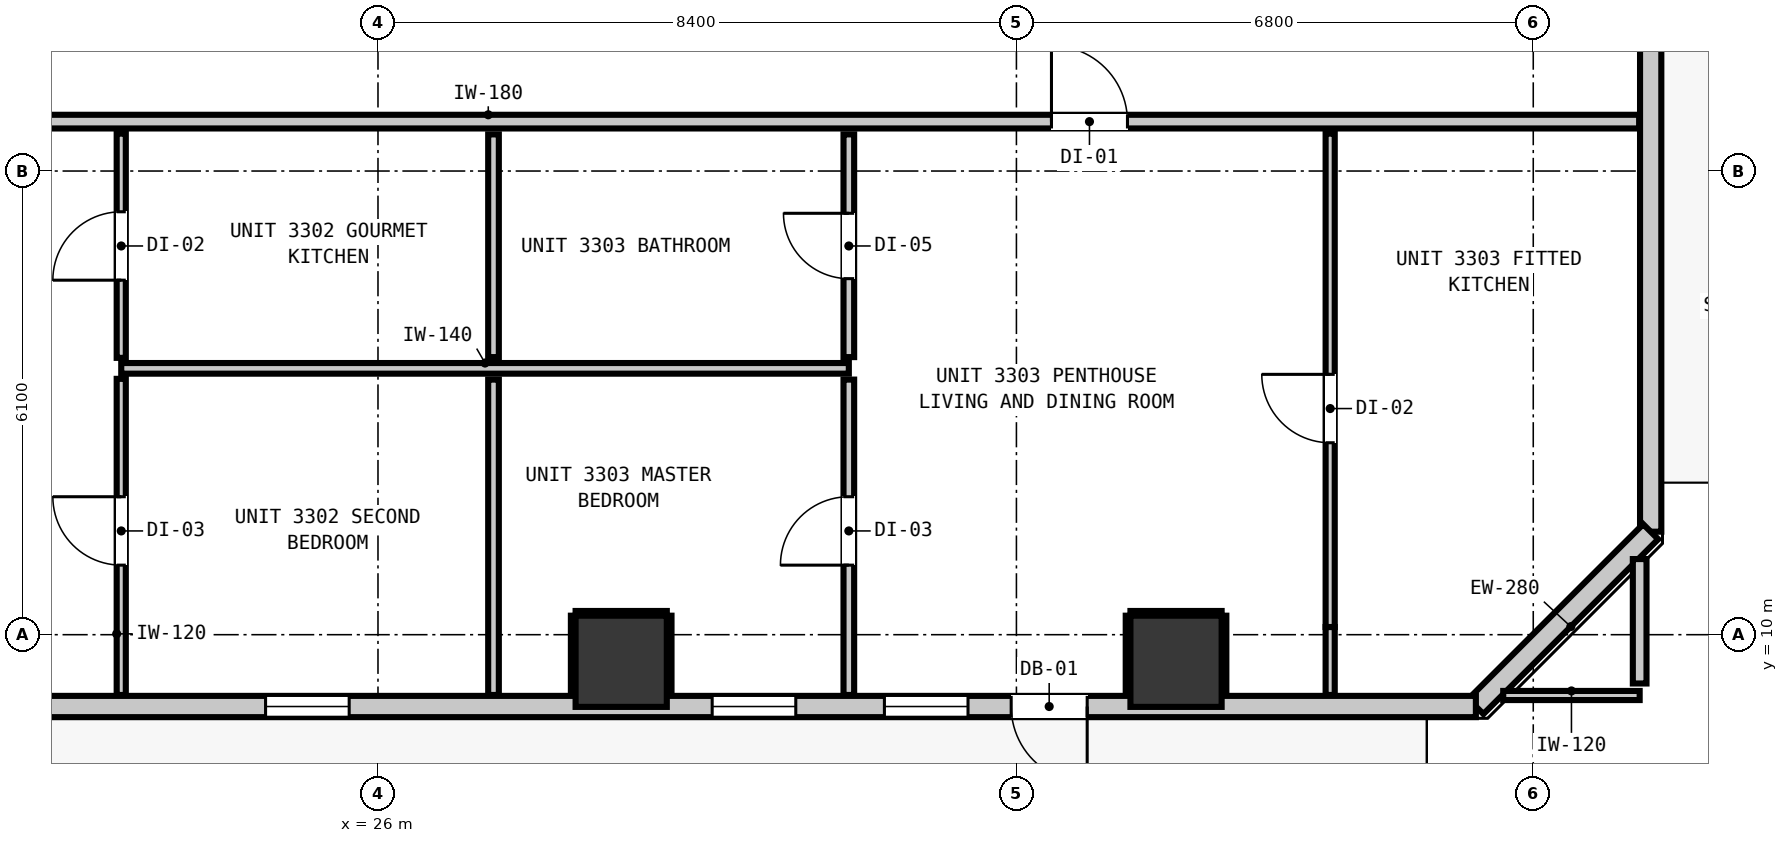
"""IFC4 building model, lengths in metres.
Left out: names, types, materials, properties, quantities, classifications, styles, units other than length and angle.
Written with IfcOpenShell. Run it as: python <this file> out.ifc"""

import sys

from ifc_helpers import new_model, si_unit, direction, frame, frame_2d, origin, origin_2d, place, context, subcontext, project, spatial, rectangle, extrude, element, fill, save


model = new_model("IFC4")
c1 = context("Model", 3, precision=1e-05, world=origin(), true_north=direction((0.0, 1.0)))
c2 = subcontext(c1, "Body", "Model", "MODEL_VIEW")
j1 = project(units=[si_unit("LENGTHUNIT", "METRE"), si_unit("PLANEANGLEUNIT", "RADIAN")], contexts=[c1])
p1 = place(None, origin())
s1 = spatial("IfcSite", under=j1, at=p1, CompositionType="ELEMENT")
p2 = place(p1, origin())
s2 = spatial("IfcBuilding", under=s1, at=p2, CompositionType="ELEMENT")
p3 = place(p2, frame((0.0, 0.0, 116.04)))
s3 = spatial("IfcBuildingStorey", under=s2, at=p3, CompositionType="ELEMENT", Elevation=116.04)
for number, where, z_axis, x_axis in (
    (1, (29.2, 9.65, 0.0), (0.0, 0.0, 1.0), (1.0, 0.0, 0.0)),
    (2, (36.5, 9.65, 0.0), (0.0, 0.0, 1.0), (1.0, 0.0, 0.0)),
):
    element("IfcColumn", number, at=place(p3, frame(where, z_axis=z_axis, x_axis=x_axis)), inside=s3, PredefinedType="COLUMN", context=c2, shape_type="SweptSolid", body=[
        extrude(rectangle(XDim=1.2, YDim=1.2, at=origin_2d()), origin(), (0.0, 0.0, 1.0), 3.32),
    ])
p4 = place(p3, frame((42.745, 43.645, 0.0), z_axis=(0.0, 0.0, 1.0), x_axis=(0.0, -1.0, 0.0)))
e3 = element("IfcWall", 3, at=p4, inside=s3, PredefinedType="STANDARD", context=c2, shape_type="SweptSolid", body=[
    extrude(rectangle(XDim=32.29, YDim=0.28, at=frame_2d((16.145, 0.0))), origin(), (0.0, 0.0, 1.0), 3.08),
])
p5 = place(p4, frame((5.467, 0.0, 0.0)))
e4 = element("IfcOpeningElement", 4, at=p5, cuts=e3, PredefinedType="OPENING", context=c2, shape_type="SweptSolid", body=[
    extrude(rectangle(XDim=1.0, YDim=2.15, at=frame_2d((0.5, 1.075))), frame((0.0, 0.15, 0.0), z_axis=(0.0, -1.0, 0.0), x_axis=(1.0, 0.0, 0.0)), (0.0, 0.0, 1.0), 0.3),
])
p6 = place(p4, frame((0.293, 0.0, 0.85)))
e5 = element("IfcOpeningElement", 5, at=p6, cuts=e3, PredefinedType="OPENING", context=c2, shape_type="SweptSolid", body=[
    extrude(rectangle(XDim=1.1, YDim=2.05, at=frame_2d((0.55, 1.025))), frame((0.0, 0.15, 0.0), z_axis=(0.0, -1.0, 0.0), x_axis=(1.0, 0.0, 0.0)), (0.0, 0.0, 1.0), 0.3),
])
p7 = place(p4, frame((14.773, 0.0, 0.85)))
e6 = element("IfcOpeningElement", 6, at=p7, cuts=e3, PredefinedType="OPENING", context=c2, shape_type="SweptSolid", body=[
    extrude(rectangle(XDim=1.1, YDim=2.05, at=frame_2d((0.55, 1.025))), frame((0.0, 0.15, 0.0), z_axis=(0.0, -1.0, 0.0), x_axis=(1.0, 0.0, 0.0)), (0.0, 0.0, 1.0), 0.3),
])
p8 = place(p3, frame((42.745, 11.355, 0.0), z_axis=(0.0, 0.0, 1.0), x_axis=(-0.707106781187, -0.707106781187, 0.0)))
e7 = element("IfcWall", 7, at=p8, inside=s3, PredefinedType="STANDARD", context=c2, shape_type="SweptSolid", body=[
    extrude(rectangle(XDim=3.253, YDim=0.28, at=frame_2d((1.626, 0.0))), origin(), (0.0, 0.0, 1.0), 3.08),
])
p9 = place(p3, frame((40.445, 9.055, 0.0), z_axis=(0.0, 0.0, 1.0), x_axis=(-1.0, 0.0, 0.0)))
e8 = element("IfcWall", 8, at=p9, inside=s3, PredefinedType="STANDARD", context=c2, shape_type="SweptSolid", body=[
    extrude(rectangle(XDim=35.09, YDim=0.28, at=frame_2d((17.545, 0.0))), origin(), (0.0, 0.0, 1.0), 3.08),
])
p10 = place(p9, frame((5.114, 0.0, 0.0)))
e9 = element("IfcOpeningElement", 9, at=p10, cuts=e8, PredefinedType="OPENING", context=c2, shape_type="SweptSolid", body=[
    extrude(rectangle(XDim=1.0, YDim=2.15, at=frame_2d((0.5, 1.075))), frame((0.0, 0.15, 0.0), z_axis=(0.0, -1.0, 0.0), x_axis=(1.0, 0.0, 0.0)), (0.0, 0.0, 1.0), 0.3),
])
p11 = place(p9, frame((31.877, 0.0, 0.85)))
e10 = element("IfcOpeningElement", 10, at=p11, cuts=e8, PredefinedType="OPENING", context=c2, shape_type="SweptSolid", body=[
    extrude(rectangle(XDim=1.1, YDim=2.05, at=frame_2d((0.55, 1.025))), frame((0.0, 0.15, 0.0), z_axis=(0.0, -1.0, 0.0), x_axis=(1.0, 0.0, 0.0)), (0.0, 0.0, 1.0), 0.3),
])
p12 = place(p9, frame((34.198, 0.0, 0.85)))
e11 = element("IfcOpeningElement", 11, at=p12, cuts=e8, PredefinedType="OPENING", context=c2, shape_type="SweptSolid", body=[
    extrude(rectangle(XDim=0.58, YDim=1.5, at=frame_2d((0.29, 0.75))), frame((0.0, 0.15, 0.0), z_axis=(0.0, -1.0, 0.0), x_axis=(1.0, 0.0, 0.0)), (0.0, 0.0, 1.0), 0.3),
])
p13 = place(p9, frame((21.515, 0.0, 0.85)))
e12 = element("IfcOpeningElement", 12, at=p13, cuts=e8, PredefinedType="OPENING", context=c2, shape_type="SweptSolid", body=[
    extrude(rectangle(XDim=1.1, YDim=2.05, at=frame_2d((0.55, 1.025))), frame((0.0, 0.15, 0.0), z_axis=(0.0, -1.0, 0.0), x_axis=(1.0, 0.0, 0.0)), (0.0, 0.0, 1.0), 0.3),
])
p14 = place(p9, frame((24.715, 0.0, 0.85)))
e13 = element("IfcOpeningElement", 13, at=p14, cuts=e8, PredefinedType="OPENING", context=c2, shape_type="SweptSolid", body=[
    extrude(rectangle(XDim=1.1, YDim=2.05, at=frame_2d((0.55, 1.025))), frame((0.0, 0.15, 0.0), z_axis=(0.0, -1.0, 0.0), x_axis=(1.0, 0.0, 0.0)), (0.0, 0.0, 1.0), 0.3),
])
p15 = place(p9, frame((14.824, 0.0, 0.85)))
e14 = element("IfcOpeningElement", 14, at=p15, cuts=e8, PredefinedType="OPENING", context=c2, shape_type="SweptSolid", body=[
    extrude(rectangle(XDim=1.1, YDim=2.05, at=frame_2d((0.55, 1.025))), frame((0.0, 0.15, 0.0), z_axis=(0.0, -1.0, 0.0), x_axis=(1.0, 0.0, 0.0)), (0.0, 0.0, 1.0), 0.3),
])
p16 = place(p9, frame((6.682, 0.0, 0.85)))
e15 = element("IfcOpeningElement", 15, at=p16, cuts=e8, PredefinedType="OPENING", context=c2, shape_type="SweptSolid", body=[
    extrude(rectangle(XDim=1.1, YDim=2.05, at=frame_2d((0.55, 1.025))), frame((0.0, 0.15, 0.0), z_axis=(0.0, -1.0, 0.0), x_axis=(1.0, 0.0, 0.0)), (0.0, 0.0, 1.0), 0.3),
])
p17 = place(p9, frame((8.948, 0.0, 0.85)))
e16 = element("IfcOpeningElement", 16, at=p17, cuts=e8, PredefinedType="OPENING", context=c2, shape_type="SweptSolid", body=[
    extrude(rectangle(XDim=1.1, YDim=2.05, at=frame_2d((0.55, 1.025))), frame((0.0, 0.15, 0.0), z_axis=(0.0, -1.0, 0.0), x_axis=(1.0, 0.0, 0.0)), (0.0, 0.0, 1.0), 0.3),
])
p18 = place(p3, frame((3.207, 16.75, 0.0), z_axis=(0.0, 0.0, 1.0), x_axis=(1.0, 0.0, 0.0)))
e17 = element("IfcWall", 17, at=p18, inside=s3, PredefinedType="PARTITIONING", context=c2, shape_type="SweptSolid", body=[
    extrude(rectangle(XDim=39.386, YDim=0.18, at=frame_2d((19.693, 0.0))), origin(), (0.0, 0.0, 1.0), 3.08),
])
p19 = place(p18, frame((4.311, 0.0, 0.0)))
e18 = element("IfcOpeningElement", 18, at=p19, cuts=e17, PredefinedType="OPENING", context=c2, shape_type="SweptSolid", body=[
    extrude(rectangle(XDim=1.0, YDim=2.15, at=frame_2d((0.5, 1.075))), frame((0.0, 0.1, 0.0), z_axis=(0.0, -1.0, 0.0), x_axis=(1.0, 0.0, 0.0)), (0.0, 0.0, 1.0), 0.2),
])
p20 = place(p18, frame((15.834, 0.0, 0.0)))
e19 = element("IfcOpeningElement", 19, at=p20, cuts=e17, PredefinedType="OPENING", context=c2, shape_type="SweptSolid", body=[
    extrude(rectangle(XDim=1.0, YDim=2.15, at=frame_2d((0.5, 1.075))), frame((0.0, 0.1, 0.0), z_axis=(0.0, -1.0, 0.0), x_axis=(1.0, 0.0, 0.0)), (0.0, 0.0, 1.0), 0.2),
])
p21 = place(p18, frame((31.654, 0.0, 0.0)))
e20 = element("IfcOpeningElement", 20, at=p21, cuts=e17, PredefinedType="OPENING", context=c2, shape_type="SweptSolid", body=[
    extrude(rectangle(XDim=1.0, YDim=2.15, at=frame_2d((0.5, 1.075))), frame((0.0, 0.1, 0.0), z_axis=(0.0, -1.0, 0.0), x_axis=(1.0, 0.0, 0.0)), (0.0, 0.0, 1.0), 0.2),
])
p22 = place(p3, frame((22.622, 13.504, 0.0), z_axis=(0.0, 0.0, 1.0), x_axis=(1.0, 0.0, 0.0)))
e21 = element("IfcWall", 21, at=p22, inside=s3, PredefinedType="PARTITIONING", context=c2, shape_type="SweptSolid", body=[
    extrude(rectangle(XDim=9.573, YDim=0.14, at=frame_2d((4.787, 0.0))), origin(), (0.0, 0.0, 1.0), 3.08),
])
p23 = place(p3, frame((40.805, 9.2, 0.0), z_axis=(0.0, 0.0, 1.0), x_axis=(1.0, 0.0, 0.0)))
e22 = element("IfcWall", 22, at=p23, inside=s3, PredefinedType="PARTITIONING", context=c2, shape_type="SweptSolid", body=[
    extrude(rectangle(XDim=1.795, YDim=0.12, at=frame_2d((0.897, 0.0))), origin(), (0.0, 0.0, 1.0), 3.08),
])
p24 = place(p3, frame((42.6, 9.358, 0.0), z_axis=(0.0, 0.0, 1.0), x_axis=(0.0, 1.0, 0.0)))
e23 = element("IfcWall", 23, at=p24, inside=s3, PredefinedType="PARTITIONING", context=c2, shape_type="SweptSolid", body=[
    extrude(rectangle(XDim=1.637, YDim=0.18, at=frame_2d((0.819, 0.0))), origin(), (0.0, 0.0, 1.0), 3.08),
])
p25 = place(p3, frame((27.52, 9.207, 0.0), z_axis=(0.0, 0.0, 1.0), x_axis=(0.0, 1.0, 0.0)))
e24 = element("IfcWall", 24, at=p25, inside=s3, PredefinedType="PARTITIONING", context=c2, shape_type="SweptSolid", body=[
    extrude(rectangle(XDim=4.149, YDim=0.14, at=frame_2d((2.074, 0.0))), origin(), (0.0, 0.0, 1.0), 3.08),
])
p26 = place(p3, frame((27.52, 13.652, 0.0), z_axis=(0.0, 0.0, 1.0), x_axis=(0.0, 1.0, 0.0)))
e25 = element("IfcWall", 25, at=p26, inside=s3, PredefinedType="PARTITIONING", context=c2, shape_type="SweptSolid", body=[
    extrude(rectangle(XDim=2.93, YDim=0.14, at=frame_2d((1.465, 0.0))), origin(), (0.0, 0.0, 1.0), 3.08),
])
p27 = place(p3, frame((32.195, 9.207, 0.0), z_axis=(0.0, 0.0, 1.0), x_axis=(0.0, 1.0, 0.0)))
e26 = element("IfcWall", 26, at=p27, inside=s3, PredefinedType="PARTITIONING", context=c2, shape_type="SweptSolid", body=[
    extrude(rectangle(XDim=4.149, YDim=0.14, at=frame_2d((2.074, 0.0))), origin(), (0.0, 0.0, 1.0), 3.08),
])
p28 = place(p27, frame((1.708, 0.0, 0.0)))
e27 = element("IfcOpeningElement", 27, at=p28, cuts=e26, PredefinedType="OPENING", context=c2, shape_type="SweptSolid", body=[
    extrude(rectangle(XDim=0.9, YDim=2.1, at=frame_2d((0.45, 1.05))), frame((0.0, 0.08, 0.0), z_axis=(0.0, -1.0, 0.0), x_axis=(1.0, 0.0, 0.0)), (0.0, 0.0, 1.0), 0.16),
])
p29 = place(p3, frame((32.195, 13.652, 0.0), z_axis=(0.0, 0.0, 1.0), x_axis=(0.0, 1.0, 0.0)))
e28 = element("IfcWall", 28, at=p29, inside=s3, PredefinedType="PARTITIONING", context=c2, shape_type="SweptSolid", body=[
    extrude(rectangle(XDim=2.93, YDim=0.14, at=frame_2d((1.465, 0.0))), origin(), (0.0, 0.0, 1.0), 3.08),
])
p30 = place(p29, frame((1.032, 0.0, 0.0)))
e29 = element("IfcOpeningElement", 29, at=p30, cuts=e28, PredefinedType="OPENING", context=c2, shape_type="SweptSolid", body=[
    extrude(rectangle(XDim=0.86, YDim=2.02, at=frame_2d((0.43, 1.01))), frame((0.0, 0.08, 0.0), z_axis=(0.0, -1.0, 0.0), x_axis=(1.0, 0.0, 0.0)), (0.0, 0.0, 1.0), 0.16),
])
p31 = place(p3, frame((22.622, 9.207, 0.0), z_axis=(0.0, 0.0, 1.0), x_axis=(0.0, 1.0, 0.0)))
e30 = element("IfcWall", 30, at=p31, inside=s3, PredefinedType="PARTITIONING", context=c2, shape_type="SweptSolid", body=[
    extrude(rectangle(XDim=4.159, YDim=0.12, at=frame_2d((2.08, 0.0))), origin(), (0.0, 0.0, 1.0), 3.08),
])
p32 = place(p31, frame((1.708, 0.0, 0.0)))
e31 = element("IfcOpeningElement", 31, at=p32, cuts=e30, PredefinedType="OPENING", context=c2, shape_type="SweptSolid", body=[
    extrude(rectangle(XDim=0.9, YDim=2.1, at=frame_2d((0.45, 1.05))), frame((0.0, 0.07, 0.0), z_axis=(0.0, -1.0, 0.0), x_axis=(1.0, 0.0, 0.0)), (0.0, 0.0, 1.0), 0.14),
])
p33 = place(p3, frame((22.622, 13.642, 0.0), z_axis=(0.0, 0.0, 1.0), x_axis=(0.0, 1.0, 0.0)))
e32 = element("IfcWall", 32, at=p33, inside=s3, PredefinedType="PARTITIONING", context=c2, shape_type="SweptSolid", body=[
    extrude(rectangle(XDim=2.95, YDim=0.12, at=frame_2d((1.475, 0.0))), origin(), (0.0, 0.0, 1.0), 3.08),
])
p34 = place(p33, frame((1.022, 0.0, 0.0)))
e33 = element("IfcOpeningElement", 33, at=p34, cuts=e32, PredefinedType="OPENING", context=c2, shape_type="SweptSolid", body=[
    extrude(rectangle(XDim=0.9, YDim=2.1, at=frame_2d((0.45, 1.05))), frame((0.0, 0.07, 0.0), z_axis=(0.0, -1.0, 0.0), x_axis=(1.0, 0.0, 0.0)), (0.0, 0.0, 1.0), 0.14),
])
p35 = place(p3, frame((38.528, 9.207, 0.0), z_axis=(0.0, 0.0, 1.0), x_axis=(0.0, 1.0, 0.0)))
e34 = element("IfcWall", 34, at=p35, inside=s3, PredefinedType="PARTITIONING", context=c2, shape_type="SweptSolid", body=[
    extrude(rectangle(XDim=0.894, YDim=0.12, at=frame_2d((0.447, 0.0))), origin(), (0.0, 0.0, 1.0), 3.08),
])
p36 = place(p3, frame((38.528, 10.101, 0.0), z_axis=(0.0, 0.0, 1.0), x_axis=(0.0, 1.0, 0.0)))
e35 = element("IfcWall", 35, at=p36, inside=s3, PredefinedType="PARTITIONING", context=c2, shape_type="SweptSolid", body=[
    extrude(rectangle(XDim=6.491, YDim=0.12, at=frame_2d((3.246, 0.0))), origin(), (0.0, 0.0, 1.0), 2.565),
])
p37 = place(p36, frame((2.424, 0.0, 0.0)))
e36 = element("IfcOpeningElement", 36, at=p37, cuts=e35, PredefinedType="OPENING", context=c2, shape_type="SweptSolid", body=[
    extrude(rectangle(XDim=0.9, YDim=2.1, at=frame_2d((0.45, 1.05))), frame((0.0, 0.07, 0.0), z_axis=(0.0, -1.0, 0.0), x_axis=(1.0, 0.0, 0.0)), (0.0, 0.0, 1.0), 0.14),
])
p38 = place(p3, frame((28.6, 10.282, 0.0), z_axis=(0.0, 0.0, 1.0), x_axis=(1.0, 0.0, 0.0)))
e37 = element("IfcWall", 37, at=p38, inside=s3, PredefinedType="PARTITIONING", context=c2, shape_type="SweptSolid", body=[
    extrude(rectangle(XDim=1.2, YDim=0.06, at=frame_2d((0.6, 0.0))), origin(), (0.0, 0.0, 1.0), 1.45),
])
for number, where, z_axis, x_axis in (
    (38, (28.568, 9.21, 0.0), (0.0, 0.0, 1.0), (0.0, 1.0, 0.0)),
    (39, (29.832, 9.21, 0.0), (0.0, 0.0, 1.0), (0.0, 1.0, 0.0)),
):
    element("IfcWall", number, at=place(p3, frame(where, z_axis=z_axis, x_axis=x_axis)), inside=s3, PredefinedType="PARTITIONING", context=c2, shape_type="SweptSolid", body=[
        extrude(rectangle(XDim=1.04, YDim=0.06, at=frame_2d((0.52, 0.0))), origin(), (0.0, 0.0, 1.0), 1.45),
    ])
p39 = place(p3, frame((35.9, 10.282, 0.0), z_axis=(0.0, 0.0, 1.0), x_axis=(1.0, 0.0, 0.0)))
e40 = element("IfcWall", 40, at=p39, inside=s3, PredefinedType="PARTITIONING", context=c2, shape_type="SweptSolid", body=[
    extrude(rectangle(XDim=1.2, YDim=0.06, at=frame_2d((0.6, 0.0))), origin(), (0.0, 0.0, 1.0), 1.45),
])
for number, where, z_axis, x_axis in (
    (41, (35.868, 9.21, 0.0), (0.0, 0.0, 1.0), (0.0, 1.0, 0.0)),
    (42, (37.132, 9.21, 0.0), (0.0, 0.0, 1.0), (0.0, 1.0, 0.0)),
):
    element("IfcWall", number, at=place(p3, frame(where, z_axis=z_axis, x_axis=x_axis)), inside=s3, PredefinedType="PARTITIONING", context=c2, shape_type="SweptSolid", body=[
        extrude(rectangle(XDim=1.04, YDim=0.06, at=frame_2d((0.52, 0.0))), origin(), (0.0, 0.0, 1.0), 1.45),
    ])
p40 = place(p10, origin())
e43 = element("IfcDoor", 43, at=p40, inside=s3, OperationType="SINGLE_SWING_LEFT", PredefinedType="DOOR", context=c2, shape_type="SweptSolid", body=[
    extrude(rectangle(XDim=1.0, YDim=2.15, at=frame_2d((0.5, 1.075))), frame((0.0, 0.025, 0.0), z_axis=(0.0, -1.0, 0.0), x_axis=(1.0, 0.0, 0.0)), (0.0, 0.0, 1.0), 0.05),
])
fill(e9, e43)
p41 = place(p15, origin())
e44 = element("IfcWindow", 44, at=p41, inside=s3, PartitioningType="SINGLE_PANEL", PredefinedType="WINDOW", context=c2, shape_type="SweptSolid", body=[
    extrude(rectangle(XDim=1.1, YDim=2.05, at=frame_2d((0.55, 1.025))), frame((0.0, 0.03, 0.0), z_axis=(0.0, -1.0, 0.0), x_axis=(1.0, 0.0, 0.0)), (0.0, 0.0, 1.0), 0.06),
])
fill(e14, e44)
p42 = place(p16, origin())
e45 = element("IfcWindow", 45, at=p42, inside=s3, PartitioningType="SINGLE_PANEL", PredefinedType="WINDOW", context=c2, shape_type="SweptSolid", body=[
    extrude(rectangle(XDim=1.1, YDim=2.05, at=frame_2d((0.55, 1.025))), frame((0.0, 0.03, 0.0), z_axis=(0.0, -1.0, 0.0), x_axis=(1.0, 0.0, 0.0)), (0.0, 0.0, 1.0), 0.06),
])
fill(e15, e45)
p43 = place(p17, origin())
e46 = element("IfcWindow", 46, at=p43, inside=s3, PartitioningType="SINGLE_PANEL", PredefinedType="WINDOW", context=c2, shape_type="SweptSolid", body=[
    extrude(rectangle(XDim=1.1, YDim=2.05, at=frame_2d((0.55, 1.025))), frame((0.0, 0.03, 0.0), z_axis=(0.0, -1.0, 0.0), x_axis=(1.0, 0.0, 0.0)), (0.0, 0.0, 1.0), 0.06),
])
fill(e16, e46)
p44 = place(p34, origin())
e47 = element("IfcDoor", 47, at=p44, inside=s3, OperationType="SINGLE_SWING_LEFT", PredefinedType="DOOR", context=c2, shape_type="SweptSolid", body=[
    extrude(rectangle(XDim=0.9, YDim=2.1, at=frame_2d((0.45, 1.05))), frame((0.0, 0.025, 0.0), z_axis=(0.0, -1.0, 0.0), x_axis=(1.0, 0.0, 0.0)), (0.0, 0.0, 1.0), 0.05),
])
fill(e33, e47)
p45 = place(p32, origin())
e48 = element("IfcDoor", 48, at=p45, inside=s3, OperationType="SINGLE_SWING_RIGHT", PredefinedType="DOOR", context=c2, shape_type="SweptSolid", body=[
    extrude(rectangle(XDim=0.9, YDim=2.1, at=frame_2d((0.45, 1.05))), frame((0.0, 0.025, 0.0), z_axis=(0.0, -1.0, 0.0), x_axis=(1.0, 0.0, 0.0)), (0.0, 0.0, 1.0), 0.05),
])
fill(e31, e48)
p46 = place(p21, origin())
e49 = element("IfcDoor", 49, at=p46, inside=s3, OperationType="SINGLE_SWING_LEFT", PredefinedType="DOOR", context=c2, shape_type="SweptSolid", body=[
    extrude(rectangle(XDim=1.0, YDim=2.15, at=frame_2d((0.5, 1.075))), frame((0.0, 0.025, 0.0), z_axis=(0.0, -1.0, 0.0), x_axis=(1.0, 0.0, 0.0)), (0.0, 0.0, 1.0), 0.05),
])
fill(e20, e49)
p47 = place(p30, origin())
e50 = element("IfcDoor", 50, at=p47, inside=s3, OperationType="SINGLE_SWING_RIGHT", PredefinedType="DOOR", context=c2, shape_type="SweptSolid", body=[
    extrude(rectangle(XDim=0.86, YDim=2.02, at=frame_2d((0.43, 1.01))), frame((0.0, 0.025, 0.0), z_axis=(0.0, -1.0, 0.0), x_axis=(1.0, 0.0, 0.0)), (0.0, 0.0, 1.0), 0.05),
])
fill(e29, e50)
p48 = place(p28, origin())
e51 = element("IfcDoor", 51, at=p48, inside=s3, OperationType="SINGLE_SWING_LEFT", PredefinedType="DOOR", context=c2, shape_type="SweptSolid", body=[
    extrude(rectangle(XDim=0.9, YDim=2.1, at=frame_2d((0.45, 1.05))), frame((0.0, 0.025, 0.0), z_axis=(0.0, -1.0, 0.0), x_axis=(1.0, 0.0, 0.0)), (0.0, 0.0, 1.0), 0.05),
])
fill(e27, e51)
p49 = place(p37, origin())
e52 = element("IfcDoor", 52, at=p49, inside=s3, OperationType="SINGLE_SWING_RIGHT", PredefinedType="DOOR", context=c2, shape_type="SweptSolid", body=[
    extrude(rectangle(XDim=0.9, YDim=2.1, at=frame_2d((0.45, 1.05))), frame((0.0, 0.025, 0.0), z_axis=(0.0, -1.0, 0.0), x_axis=(1.0, 0.0, 0.0)), (0.0, 0.0, 1.0), 0.05),
])
fill(e36, e52)
save(model, sys.argv[1])
